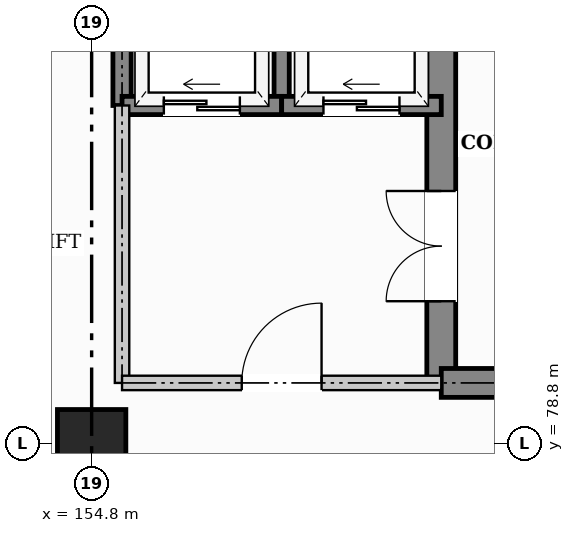
"""IFC4 building model, lengths in metres.
Left out: names, types, materials, properties, quantities, classifications, styles, units other than length and angle.
Written with IfcOpenShell. Run it as: python <this file> out.ifc"""

import sys

from ifc_helpers import new_model, si_unit, direction, frame, frame_2d, origin, origin_2d, place, context, subcontext, project, spatial, rectangle, extrude, element, fill, save


model = new_model("IFC4")
c1 = context("Model", 3, precision=1e-05, world=origin(), true_north=direction((0.0, 1.0)))
c2 = subcontext(c1, "Body", "Model", "MODEL_VIEW")
j1 = project(units=[si_unit("LENGTHUNIT", "METRE"), si_unit("PLANEANGLEUNIT", "RADIAN")], contexts=[c1])
p1 = place(None, origin())
s1 = spatial("IfcSite", under=j1, at=p1, CompositionType="ELEMENT")
p2 = place(p1, origin())
s2 = spatial("IfcBuilding", under=s1, at=p2, CompositionType="ELEMENT")
p3 = place(p2, origin())
s3 = spatial("IfcBuildingStorey", under=s2, at=p3, CompositionType="ELEMENT", Elevation=0.0)
p4 = place(p3, frame((154.8, 78.8, 0.0), z_axis=(0.0, 0.0, 1.0), x_axis=(1.0, 0.0, 0.0)))
e1 = element("IfcColumn", 1, at=p4, inside=s3, PredefinedType="COLUMN", context=c2, shape_type="SweptSolid", body=[
    extrude(rectangle(XDim=0.9, YDim=0.9, at=origin_2d()), origin(), (0.0, 0.0, 1.0), 5.1),
])
p5 = place(p3, frame((159.4, 79.6, 0.0), z_axis=(0.0, 0.0, 1.0), x_axis=(0.0, 1.0, 0.0)))
e2 = element("IfcWall", 2, at=p5, inside=s3, PredefinedType="SHEAR", context=c2, shape_type="SweptSolid", body=[
    extrude(rectangle(XDim=6.0, YDim=0.38, at=frame_2d((3.0, 0.0))), origin(), (0.0, 0.0, 1.0), 4.78),
])
p6 = place(p5, frame((1.075, 0.0, 0.0)))
e3 = element("IfcOpeningElement", 3, at=p6, cuts=e2, PredefinedType="OPENING", context=c2, shape_type="SweptSolid", body=[
    extrude(rectangle(XDim=1.45, YDim=2.2, at=frame_2d((0.725, 1.1))), frame((0.0, 0.2, 0.0), z_axis=(0.0, -1.0, 0.0), x_axis=(1.0, 0.0, 0.0)), (0.0, 0.0, 1.0), 0.4),
])
p7 = place(p3, frame((159.4, 79.6, 0.0), z_axis=(0.0, 0.0, 1.0), x_axis=(1.0, 0.0, 0.0)))
e4 = element("IfcWall", 4, at=p7, inside=s3, PredefinedType="SHEAR", context=c2, shape_type="SweptSolid", body=[
    extrude(rectangle(XDim=7.0, YDim=0.38, at=frame_2d((3.5, 0.0))), origin(), (0.0, 0.0, 1.0), 4.78),
])
p8 = place(p3, frame((155.2, 83.25, 0.0), z_axis=(0.0, 0.0, 1.0), x_axis=(0.0, 1.0, 0.0)))
e5 = element("IfcWall", 5, at=p8, inside=s3, PredefinedType="SHEAR", context=c2, shape_type="SweptSolid", body=[
    extrude(rectangle(XDim=2.35, YDim=0.24, at=frame_2d((1.175, 0.0))), origin(), (0.0, 0.0, 1.0), 4.78),
])
p9 = place(p3, frame((157.3, 83.25, 0.0), z_axis=(0.0, 0.0, 1.0), x_axis=(0.0, 1.0, 0.0)))
e6 = element("IfcWall", 6, at=p9, inside=s3, PredefinedType="SHEAR", context=c2, shape_type="SweptSolid", body=[
    extrude(rectangle(XDim=2.35, YDim=0.2, at=frame_2d((1.175, 0.0))), origin(), (0.0, 0.0, 1.0), 4.78),
])
p10 = place(p3, frame((155.2, 83.25, 0.0), z_axis=(0.0, 0.0, 1.0), x_axis=(1.0, 0.0, 0.0)))
e7 = element("IfcWall", 7, at=p10, inside=s3, PredefinedType="SHEAR", context=c2, shape_type="SweptSolid", body=[
    extrude(rectangle(XDim=2.1, YDim=0.24, at=frame_2d((1.05, 0.0))), origin(), (0.0, 0.0, 1.0), 4.78),
])
p11 = place(p10, frame((0.55, 0.0, 0.0)))
e8 = element("IfcOpeningElement", 8, at=p11, cuts=e7, PredefinedType="OPENING", context=c2, shape_type="SweptSolid", body=[
    extrude(rectangle(XDim=1.0, YDim=2.1, at=frame_2d((0.5, 1.05))), frame((0.0, 0.13, 0.0), z_axis=(0.0, -1.0, 0.0), x_axis=(1.0, 0.0, 0.0)), (0.0, 0.0, 1.0), 0.26),
])
p12 = place(p3, frame((157.3, 83.25, 0.0), z_axis=(0.0, 0.0, 1.0), x_axis=(1.0, 0.0, 0.0)))
e9 = element("IfcWall", 9, at=p12, inside=s3, PredefinedType="SHEAR", context=c2, shape_type="SweptSolid", body=[
    extrude(rectangle(XDim=2.1, YDim=0.24, at=frame_2d((1.05, 0.0))), origin(), (0.0, 0.0, 1.0), 4.78),
])
p13 = place(p12, frame((0.55, 0.0, 0.0)))
e10 = element("IfcOpeningElement", 10, at=p13, cuts=e9, PredefinedType="OPENING", context=c2, shape_type="SweptSolid", body=[
    extrude(rectangle(XDim=1.0, YDim=2.1, at=frame_2d((0.5, 1.05))), frame((0.0, 0.13, 0.0), z_axis=(0.0, -1.0, 0.0), x_axis=(1.0, 0.0, 0.0)), (0.0, 0.0, 1.0), 0.26),
])
p14 = place(p3, frame((155.2, 79.6, 0.0), z_axis=(0.0, 0.0, 1.0), x_axis=(0.0, 1.0, 0.0)))
e11 = element("IfcWall", 11, at=p14, inside=s3, PredefinedType="PARTITIONING", context=c2, shape_type="SweptSolid", body=[
    extrude(rectangle(XDim=3.65, YDim=0.19, at=frame_2d((1.825, 0.0))), origin(), (0.0, 0.0, 1.0), 4.78),
])
p15 = place(p3, frame((155.2, 79.6, 0.0), z_axis=(0.0, 0.0, 1.0), x_axis=(1.0, 0.0, 0.0)))
e12 = element("IfcWall", 12, at=p15, inside=s3, PredefinedType="PARTITIONING", context=c2, shape_type="SweptSolid", body=[
    extrude(rectangle(XDim=4.2, YDim=0.19, at=frame_2d((2.1, 0.0))), origin(), (0.0, 0.0, 1.0), 4.78),
])
p16 = place(p15, frame((1.575, 0.0, 0.0)))
e13 = element("IfcOpeningElement", 13, at=p16, cuts=e12, PredefinedType="OPENING", context=c2, shape_type="SweptSolid", body=[
    extrude(rectangle(XDim=1.05, YDim=2.15, at=frame_2d((0.525, 1.075))), frame((0.0, 0.105, 0.0), z_axis=(0.0, -1.0, 0.0), x_axis=(1.0, 0.0, 0.0)), (0.0, 0.0, 1.0), 0.21),
])
p17 = place(p6, origin())
e14 = element("IfcDoor", 14, at=p17, inside=s3, OperationType="DOUBLE_DOOR_SINGLE_SWING", PredefinedType="DOOR", context=c2, shape_type="SweptSolid", body=[
    extrude(rectangle(XDim=1.45, YDim=2.2, at=frame_2d((0.725, 1.1))), frame((0.0, 0.025, 0.0), z_axis=(0.0, -1.0, 0.0), x_axis=(1.0, 0.0, 0.0)), (0.0, 0.0, 1.0), 0.05),
])
fill(e3, e14)
p18 = place(p11, origin())
e15 = element("IfcDoor", 15, at=p18, inside=s3, OperationType="SLIDING_TO_LEFT", PredefinedType="DOOR", context=c2, shape_type="SweptSolid", body=[
    extrude(rectangle(XDim=1.0, YDim=2.1, at=frame_2d((0.5, 1.05))), frame((0.0, 0.025, 0.0), z_axis=(0.0, -1.0, 0.0), x_axis=(1.0, 0.0, 0.0)), (0.0, 0.0, 1.0), 0.05),
])
fill(e8, e15)
p19 = place(p13, origin())
e16 = element("IfcDoor", 16, at=p19, inside=s3, OperationType="SLIDING_TO_LEFT", PredefinedType="DOOR", context=c2, shape_type="SweptSolid", body=[
    extrude(rectangle(XDim=1.0, YDim=2.1, at=frame_2d((0.5, 1.05))), frame((0.0, 0.025, 0.0), z_axis=(0.0, -1.0, 0.0), x_axis=(1.0, 0.0, 0.0)), (0.0, 0.0, 1.0), 0.05),
])
fill(e10, e16)
p20 = place(p16, origin())
e17 = element("IfcDoor", 17, at=p20, inside=s3, OperationType="SINGLE_SWING_RIGHT", PredefinedType="DOOR", context=c2, shape_type="SweptSolid", body=[
    extrude(rectangle(XDim=1.05, YDim=2.15, at=frame_2d((0.525, 1.075))), frame((0.0, 0.025, 0.0), z_axis=(0.0, -1.0, 0.0), x_axis=(1.0, 0.0, 0.0)), (0.0, 0.0, 1.0), 0.05),
])
fill(e13, e17)
save(model, sys.argv[1])
